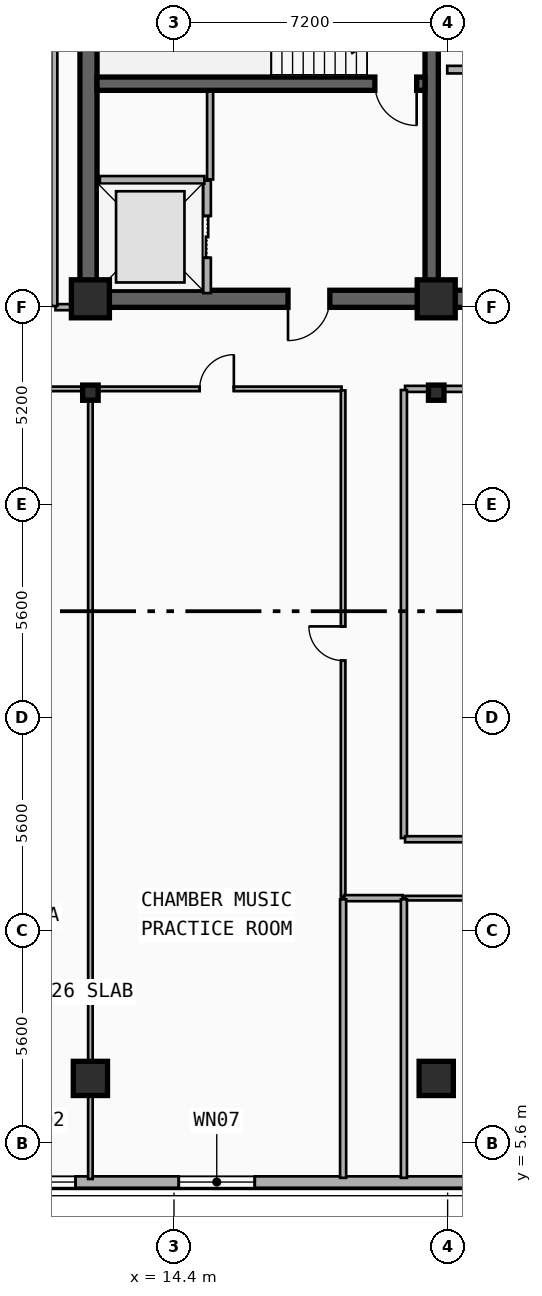
"""IFC4 building model, lengths in metres.
Left out: names, types, materials, properties, quantities, classifications, styles, units other than length and angle.
Written with IfcOpenShell. Run it as: python <this file> out.ifc"""

import sys

from ifc_helpers import new_model, si_unit, direction, frame, frame_2d, origin, origin_2d, place, context, subcontext, project, spatial, rectangle, i_section, extrude, element, fill, save


model = new_model("IFC4")
c1 = context("Model", 3, precision=1e-05, world=origin(), true_north=direction((0.0, 1.0)))
c2 = subcontext(c1, "Body", "Model", "MODEL_VIEW")
j1 = project(units=[si_unit("LENGTHUNIT", "METRE"), si_unit("PLANEANGLEUNIT", "RADIAN")], contexts=[c1])
p1 = place(None, origin())
s1 = spatial("IfcSite", under=j1, at=p1, CompositionType="ELEMENT")
p2 = place(p1, origin())
s2 = spatial("IfcBuilding", under=s1, at=p2, CompositionType="ELEMENT")
p3 = place(p2, frame((0.0, 0.0, 207.6)))
s3 = spatial("IfcBuildingStorey", under=s2, at=p3, CompositionType="ELEMENT", Elevation=207.6)
p4 = place(p3, frame((21.18, 27.82, 0.0), z_axis=(0.0, 0.0, 1.0), x_axis=(-1.0, 0.0, 0.0)))
e1 = element("IfcWall", 1, at=p4, inside=s3, PredefinedType="SHEAR", context=c2, shape_type="SweptSolid", body=[
    extrude(rectangle(XDim=9.03, YDim=0.45, at=frame_2d((4.515, 0.0))), origin(), (0.0, 0.0, 1.0), 3.6),
])
p5 = place(p4, frame((2.68, 0.0, 0.0)))
e2 = element("IfcOpeningElement", 2, at=p5, cuts=e1, PredefinedType="OPENING", context=c2, shape_type="SweptSolid", body=[
    extrude(rectangle(XDim=1.1, YDim=2.15, at=frame_2d((0.55, 1.075))), frame((0.0, 0.235, 0.0), z_axis=(0.0, -1.0, 0.0), x_axis=(1.0, 0.0, 0.0)), (0.0, 0.0, 1.0), 0.47),
])
p6 = place(p3, frame((33.15, 27.82, 0.0), z_axis=(0.0, 0.0, 1.0), x_axis=(-1.0, 0.0, 0.0)))
e3 = element("IfcWall", 3, at=p6, inside=s3, PredefinedType="SHEAR", context=c2, shape_type="SweptSolid", body=[
    extrude(rectangle(XDim=11.97, YDim=0.45, at=frame_2d((5.985, 0.0))), origin(), (0.0, 0.0, 1.0), 3.6),
])
p7 = place(p6, frame((6.1, 0.0, 0.0)))
e4 = element("IfcOpeningElement", 4, at=p7, cuts=e3, PredefinedType="OPENING", context=c2, shape_type="SweptSolid", body=[
    extrude(rectangle(XDim=1.6, YDim=2.2, at=frame_2d((0.8, 1.1))), frame((0.0, 0.235, 0.0), z_axis=(0.0, -1.0, 0.0), x_axis=(1.0, 0.0, 0.0)), (0.0, 0.0, 1.0), 0.47),
])
p8 = place(p3, frame((12.15, 28.045, 0.0), z_axis=(0.0, 0.0, 1.0), x_axis=(0.0, 1.0, 0.0)))
e5 = element("IfcWall", 5, at=p8, inside=s3, PredefinedType="SHEAR", context=c2, shape_type="SweptSolid", body=[
    extrude(rectangle(XDim=8.78, YDim=0.45, at=frame_2d((4.39, 0.0))), origin(), (0.0, 0.0, 1.0), 3.6),
])
p9 = place(p3, frame((21.18, 28.045, 0.0), z_axis=(0.0, 0.0, 1.0), x_axis=(0.0, 1.0, 0.0)))
e6 = element("IfcWall", 6, at=p9, inside=s3, PredefinedType="SHEAR", context=c2, shape_type="SweptSolid", body=[
    extrude(rectangle(XDim=8.78, YDim=0.35, at=frame_2d((4.39, 0.0))), origin(), (0.0, 0.0, 1.0), 3.6),
])
p10 = place(p3, frame((21.005, 33.48, 0.0), z_axis=(0.0, 0.0, 1.0), x_axis=(-1.0, 0.0, 0.0)))
e7 = element("IfcWall", 7, at=p10, inside=s3, PredefinedType="SHEAR", context=c2, shape_type="SweptSolid", body=[
    extrude(rectangle(XDim=8.63, YDim=0.35, at=frame_2d((4.315, 0.0))), origin(), (0.0, 0.0, 1.0), 3.6),
])
p11 = place(p10, frame((0.22, 0.0, 0.0)))
e8 = element("IfcOpeningElement", 8, at=p11, cuts=e7, PredefinedType="OPENING", context=c2, shape_type="SweptSolid", body=[
    extrude(rectangle(XDim=1.1, YDim=2.15, at=frame_2d((0.55, 1.075))), frame((0.0, 0.185, 0.0), z_axis=(0.0, -1.0, 0.0), x_axis=(1.0, 0.0, 0.0)), (0.0, 0.0, 1.0), 0.37),
])
for number, where, z_axis, x_axis in (
    (9, (12.2, 27.82, 0.0), (0.0, 0.0, 1.0), (1.0, 0.0, 0.0)),
    (10, (21.3, 27.82, 0.0), (0.0, 0.0, 1.0), (1.0, 0.0, 0.0)),
):
    element("IfcColumn", number, at=place(p3, frame(where, z_axis=z_axis, x_axis=x_axis)), inside=s3, PredefinedType="COLUMN", context=c2, shape_type="SweptSolid", body=[
        extrude(rectangle(XDim=1.0, YDim=1.0, at=origin_2d()), origin(), (0.0, 0.0, 1.0), 3.6),
    ])
for number, where, z_axis, x_axis in (
    (11, (12.2, 25.35, 0.0), (0.0, 0.0, 1.0), (1.0, 0.0, 0.0)),
    (12, (21.3, 25.35, 0.0), (0.0, 0.0, 1.0), (1.0, 0.0, 0.0)),
):
    element("IfcColumn", number, at=place(p3, frame(where, z_axis=z_axis, x_axis=x_axis)), inside=s3, PredefinedType="COLUMN", context=c2, shape_type="SweptSolid", body=[
        extrude(i_section(OverallWidth=0.408, OverallDepth=0.4, WebThickness=0.025, FlangeThickness=0.039, FilletRadius=0.015, at=origin_2d()), origin(), (0.0, 0.0, 1.0), 3.6),
    ])
for number, where, z_axis, x_axis in (
    (13, (12.2, 7.415, 0.0), (0.0, -0.09, 0.996), (1.0, 0.0, 0.0)),
    (14, (21.3, 7.415, 0.0), (0.0, -0.09, 0.996), (1.0, 0.0, 0.0)),
):
    element("IfcColumn", number, at=place(p3, frame(where, z_axis=z_axis, x_axis=x_axis)), inside=s3, PredefinedType="COLUMN", context=c2, shape_type="SweptSolid", body=[
        extrude(rectangle(XDim=0.9, YDim=0.9, at=origin_2d()), origin(), (0.0, 0.0, 1.0), 3.615),
    ])
p12 = place(p3, frame((48.0, 4.58, 0.0), z_axis=(0.0, 0.0, 1.0), x_axis=(-1.0, 0.0, 0.0)))
e15 = element("IfcWall", 15, at=p12, inside=s3, PredefinedType="SOLIDWALL", context=c2, shape_type="SweptSolid", body=[
    extrude(rectangle(XDim=38.4, YDim=0.3, at=frame_2d((19.2, 0.0))), origin(), (0.0, 0.0, 1.0), 3.34),
])
p13 = place(p12, frame((36.19, 0.0, 0.48)))
e16 = element("IfcOpeningElement", 16, at=p13, cuts=e15, PredefinedType="OPENING", context=c2, shape_type="SweptSolid", body=[
    extrude(rectangle(XDim=1.8, YDim=1.8, at=frame_2d((0.9, 0.9))), frame((0.0, 0.16, 0.0), z_axis=(0.0, -1.0, 0.0), x_axis=(1.0, 0.0, 0.0)), (0.0, 0.0, 1.0), 0.32),
])
p14 = place(p12, frame((31.475, 0.0, 0.65)))
e17 = element("IfcOpeningElement", 17, at=p14, cuts=e15, PredefinedType="OPENING", context=c2, shape_type="SweptSolid", body=[
    extrude(rectangle(XDim=2.0, YDim=2.2, at=frame_2d((1.0, 1.1))), frame((0.0, 0.16, 0.0), z_axis=(0.0, -1.0, 0.0), x_axis=(1.0, 0.0, 0.0)), (0.0, 0.0, 1.0), 0.32),
])
p15 = place(p12, frame((13.014, 0.0, 0.65)))
e18 = element("IfcOpeningElement", 18, at=p15, cuts=e15, PredefinedType="OPENING", context=c2, shape_type="SweptSolid", body=[
    extrude(rectangle(XDim=2.0, YDim=2.2, at=frame_2d((1.0, 1.1))), frame((0.0, 0.16, 0.0), z_axis=(0.0, -1.0, 0.0), x_axis=(1.0, 0.0, 0.0)), (0.0, 0.0, 1.0), 0.32),
])
p16 = place(p12, frame((0.369, 0.0, 0.75)))
e19 = element("IfcOpeningElement", 19, at=p16, cuts=e15, PredefinedType="OPENING", context=c2, shape_type="SweptSolid", body=[
    extrude(rectangle(XDim=1.6, YDim=1.95, at=frame_2d((0.8, 0.975))), frame((0.0, 0.16, 0.0), z_axis=(0.0, -1.0, 0.0), x_axis=(1.0, 0.0, 0.0)), (0.0, 0.0, 1.0), 0.32),
])
p17 = place(p12, frame((7.35, 0.0, 0.65)))
e20 = element("IfcOpeningElement", 20, at=p17, cuts=e15, PredefinedType="OPENING", context=c2, shape_type="SweptSolid", body=[
    extrude(rectangle(XDim=2.0, YDim=2.2, at=frame_2d((1.0, 1.1))), frame((0.0, 0.16, 0.0), z_axis=(0.0, -1.0, 0.0), x_axis=(1.0, 0.0, 0.0)), (0.0, 0.0, 1.0), 0.32),
])
p18 = place(p3, frame((15.27, 27.97, 0.0), z_axis=(0.0, 0.0, 1.0), x_axis=(0.0, 1.0, 0.0)))
e21 = element("IfcWall", 21, at=p18, inside=s3, PredefinedType="PARTITIONING", context=c2, shape_type="SweptSolid", body=[
    extrude(rectangle(XDim=2.96, YDim=0.2, at=frame_2d((1.48, 0.0))), origin(), (0.0, 0.0, 1.0), 2.41),
])
p19 = place(p18, frame((0.93, 0.0, 0.0)))
e22 = element("IfcOpeningElement", 22, at=p19, cuts=e21, PredefinedType="OPENING", context=c2, shape_type="SweptSolid", body=[
    extrude(rectangle(XDim=1.1, YDim=2.15, at=frame_2d((0.55, 1.075))), frame((0.0, 0.11, 0.0), z_axis=(0.0, -1.0, 0.0), x_axis=(1.0, 0.0, 0.0)), (0.0, 0.0, 1.0), 0.22),
])
p20 = place(p3, frame((12.45, 30.95, 0.0), z_axis=(0.0, 0.0, 1.0), x_axis=(1.0, 0.0, 0.0)))
e23 = element("IfcWall", 23, at=p20, inside=s3, PredefinedType="PARTITIONING", context=c2, shape_type="SweptSolid", body=[
    extrude(rectangle(XDim=2.75, YDim=0.2, at=frame_2d((1.375, 0.0))), origin(), (0.0, 0.0, 1.0), 2.41),
])
p21 = place(p3, frame((21.59, 33.85, 0.0), z_axis=(0.0, 0.0, 1.0), x_axis=(1.0, 0.0, 0.0)))
e24 = element("IfcWall", 24, at=p21, inside=s3, PredefinedType="PARTITIONING", context=c2, shape_type="SweptSolid", body=[
    extrude(rectangle(XDim=1.97, YDim=0.2, at=frame_2d((0.985, 0.0))), origin(), (0.0, 0.0, 1.0), 2.41),
])
p22 = place(p3, frame((5.66, 25.45, 0.0), z_axis=(0.0, 0.0, 1.0), x_axis=(1.0, 0.0, 0.0)))
e25 = element("IfcWall", 25, at=p22, inside=s3, PredefinedType="PARTITIONING", context=c2, shape_type="SweptSolid", body=[
    extrude(rectangle(XDim=6.5, YDim=0.12, at=frame_2d((3.25, 0.0))), origin(), (0.0, 0.0, 1.0), 2.52),
])
p23 = place(p22, frame((2.8, 0.0, 0.0)))
e26 = element("IfcOpeningElement", 26, at=p23, cuts=e25, PredefinedType="OPENING", context=c2, shape_type="SweptSolid", body=[
    extrude(rectangle(XDim=0.9, YDim=2.1, at=frame_2d((0.45, 1.05))), frame((0.0, 0.07, 0.0), z_axis=(0.0, -1.0, 0.0), x_axis=(1.0, 0.0, 0.0)), (0.0, 0.0, 1.0), 0.14),
])
p24 = place(p3, frame((12.24, 25.45, 0.0), z_axis=(0.0, 0.0, 1.0), x_axis=(1.0, 0.0, 0.0)))
e27 = element("IfcWall", 27, at=p24, inside=s3, PredefinedType="PARTITIONING", context=c2, shape_type="SweptSolid", body=[
    extrude(rectangle(XDim=6.57, YDim=0.12, at=frame_2d((3.285, 0.0))), origin(), (0.0, 0.0, 1.0), 2.52),
])
p25 = place(p24, frame((2.835, 0.0, 0.0)))
e28 = element("IfcOpeningElement", 28, at=p25, cuts=e27, PredefinedType="OPENING", context=c2, shape_type="SweptSolid", body=[
    extrude(rectangle(XDim=0.9, YDim=2.1, at=frame_2d((0.45, 1.05))), frame((0.0, 0.07, 0.0), z_axis=(0.0, -1.0, 0.0), x_axis=(1.0, 0.0, 0.0)), (0.0, 0.0, 1.0), 0.14),
])
p26 = place(p3, frame((18.85, 12.09, 0.0), z_axis=(0.0, 0.0, 1.0), x_axis=(0.0, 1.0, 0.0)))
e29 = element("IfcWall", 29, at=p26, inside=s3, PredefinedType="PARTITIONING", context=c2, shape_type="SweptSolid", body=[
    extrude(rectangle(XDim=13.32, YDim=0.12, at=frame_2d((6.66, 0.0))), origin(), (0.0, 0.0, 1.0), 2.77),
])
p27 = place(p26, frame((6.21, 0.0, 0.0)))
e30 = element("IfcOpeningElement", 30, at=p27, cuts=e29, PredefinedType="OPENING", context=c2, shape_type="SweptSolid", body=[
    extrude(rectangle(XDim=0.9, YDim=2.1, at=frame_2d((0.45, 1.05))), frame((0.0, 0.07, 0.0), z_axis=(0.0, -1.0, 0.0), x_axis=(1.0, 0.0, 0.0)), (0.0, 0.0, 1.0), 0.14),
])
p28 = place(p3, frame((20.49, 12.05, 0.0), z_axis=(0.0, 0.0, 1.0), x_axis=(1.0, 0.0, 0.0)))
e31 = element("IfcWall", 31, at=p28, inside=s3, PredefinedType="PARTITIONING", context=c2, shape_type="SweptSolid", body=[
    extrude(rectangle(XDim=15.82, YDim=0.12, at=frame_2d((7.91, 0.0))), origin(), (0.0, 0.0, 1.0), 2.52),
])
p29 = place(p28, frame((7.46, 0.0, 0.0)))
e32 = element("IfcOpeningElement", 32, at=p29, cuts=e31, PredefinedType="OPENING", context=c2, shape_type="SweptSolid", body=[
    extrude(rectangle(XDim=0.9, YDim=2.1, at=frame_2d((0.45, 1.05))), frame((0.0, 0.07, 0.0), z_axis=(0.0, -1.0, 0.0), x_axis=(1.0, 0.0, 0.0)), (0.0, 0.0, 1.0), 0.14),
])
p30 = place(p3, frame((12.2, 4.66, 0.0), z_axis=(0.0, 0.0, 1.0), x_axis=(0.0, 1.0, 0.0)))
e33 = element("IfcWall", 33, at=p30, inside=s3, PredefinedType="PARTITIONING", context=c2, shape_type="SweptSolid", body=[
    extrude(rectangle(XDim=20.75, YDim=0.12, at=frame_2d((10.375, 0.0))), origin(), (0.0, 0.0, 1.0), 2.52),
])
p31 = place(p3, frame((15.35, 30.96, 0.0), z_axis=(0.0, 0.0, 1.0), x_axis=(0.0, 1.0, 0.0)))
e34 = element("IfcWall", 34, at=p31, inside=s3, PredefinedType="PARTITIONING", context=c2, shape_type="SweptSolid", body=[
    extrude(rectangle(XDim=2.31, YDim=0.16, at=frame_2d((1.155, 0.0))), origin(), (0.0, 0.0, 1.0), 3.34),
])
p32 = place(p3, frame((20.48, 25.45, 0.0), z_axis=(0.0, 0.0, 1.0), x_axis=(1.0, 0.0, 0.0)))
e35 = element("IfcWall", 35, at=p32, inside=s3, PredefinedType="PARTITIONING", context=c2, shape_type="SweptSolid", body=[
    extrude(rectangle(XDim=15.84, YDim=0.16, at=frame_2d((7.92, 0.0))), origin(), (0.0, 0.0, 1.0), 2.52),
])
p33 = place(p3, frame((11.28, 27.6, 0.0), z_axis=(0.0, 0.0, 1.0), x_axis=(1.0, 0.0, 0.0)))
e36 = element("IfcWall", 36, at=p33, inside=s3, PredefinedType="PARTITIONING", context=c2, shape_type="SweptSolid", body=[
    extrude(rectangle(XDim=0.84, YDim=0.16, at=frame_2d((0.42, 0.0))), origin(), (0.0, 0.0, 1.0), 2.41),
])
p34 = place(p3, frame((18.88, 12.05, 0.0), z_axis=(0.0, 0.0, 1.0), x_axis=(1.0, 0.0, 0.0)))
e37 = element("IfcWall", 37, at=p34, inside=s3, PredefinedType="PARTITIONING", context=c2, shape_type="SweptSolid", body=[
    extrude(rectangle(XDim=1.54, YDim=0.16, at=frame_2d((0.77, 0.0))), origin(), (0.0, 0.0, 1.0), 3.34),
])
p35 = place(p3, frame((20.45, 13.63, 0.0), z_axis=(0.0, 0.0, 1.0), x_axis=(0.0, 1.0, 0.0)))
e38 = element("IfcWall", 38, at=p35, inside=s3, PredefinedType="PARTITIONING", context=c2, shape_type="SweptSolid", body=[
    extrude(rectangle(XDim=11.79, YDim=0.16, at=frame_2d((5.895, 0.0))), origin(), (0.0, 0.0, 1.0), 2.77),
])
p36 = place(p3, frame((20.48, 13.6, 0.0), z_axis=(0.0, 0.0, 1.0), x_axis=(1.0, 0.0, 0.0)))
e39 = element("IfcWall", 39, at=p36, inside=s3, PredefinedType="PARTITIONING", context=c2, shape_type="SweptSolid", body=[
    extrude(rectangle(XDim=2.64, YDim=0.16, at=frame_2d((1.32, 0.0))), origin(), (0.0, 0.0, 1.0), 2.52),
])
p37 = place(p3, frame((11.25, 27.63, 0.0), z_axis=(0.0, 0.0, 1.0), x_axis=(0.0, 1.0, 0.0)))
e40 = element("IfcWall", 40, at=p37, inside=s3, PredefinedType="PARTITIONING", context=c2, shape_type="SweptSolid", body=[
    extrude(rectangle(XDim=10.24, YDim=0.16, at=frame_2d((5.12, 0.0))), origin(), (0.0, 0.0, 1.0), 2.82),
])
for number, where, z_axis, x_axis in (
    (41, (18.85, 4.69, 0.0), (0.0, 0.0, 1.0), (0.0, 1.0, 0.0)),
    (42, (20.45, 4.69, 0.0), (0.0, 0.0, 1.0), (0.0, 1.0, 0.0)),
):
    element("IfcWall", number, at=place(p3, frame(where, z_axis=z_axis, x_axis=x_axis)), inside=s3, PredefinedType="PARTITIONING", context=c2, shape_type="SweptSolid", body=[
        extrude(rectangle(XDim=7.33, YDim=0.16, at=frame_2d((3.665, 0.0))), origin(), (0.0, 0.0, 1.0), 2.93),
    ])
p38 = place(p13, origin())
e43 = element("IfcWindow", 43, at=p38, inside=s3, PartitioningType="SINGLE_PANEL", PredefinedType="WINDOW", context=c2, shape_type="SweptSolid", body=[
    extrude(rectangle(XDim=1.8, YDim=1.8, at=frame_2d((0.9, 0.9))), frame((0.0, 0.03, 0.0), z_axis=(0.0, -1.0, 0.0), x_axis=(1.0, 0.0, 0.0)), (0.0, 0.0, 1.0), 0.06),
])
fill(e16, e43)
p39 = place(p14, origin())
e44 = element("IfcWindow", 44, at=p39, inside=s3, PartitioningType="SINGLE_PANEL", PredefinedType="WINDOW", context=c2, shape_type="SweptSolid", body=[
    extrude(rectangle(XDim=2.0, YDim=2.2, at=frame_2d((1.0, 1.1))), frame((0.0, 0.03, 0.0), z_axis=(0.0, -1.0, 0.0), x_axis=(1.0, 0.0, 0.0)), (0.0, 0.0, 1.0), 0.06),
])
fill(e17, e44)
p40 = place(p19, origin())
e45 = element("IfcDoor", 45, at=p40, inside=s3, OperationType="DOUBLE_DOOR_SLIDING", PredefinedType="DOOR", context=c2, shape_type="SweptSolid", body=[
    extrude(rectangle(XDim=1.1, YDim=2.15, at=frame_2d((0.55, 1.075))), frame((0.0, 0.025, 0.0), z_axis=(0.0, -1.0, 0.0), x_axis=(1.0, 0.0, 0.0)), (0.0, 0.0, 1.0), 0.05),
])
fill(e22, e45)
p41 = place(p11, origin())
e46 = element("IfcDoor", 46, at=p41, inside=s3, OperationType="SINGLE_SWING_LEFT", PredefinedType="DOOR", context=c2, shape_type="SweptSolid", body=[
    extrude(rectangle(XDim=1.1, YDim=2.15, at=frame_2d((0.55, 1.075))), frame((0.0, 0.025, 0.0), z_axis=(0.0, -1.0, 0.0), x_axis=(1.0, 0.0, 0.0)), (0.0, 0.0, 1.0), 0.05),
])
fill(e8, e46)
p42 = place(p5, origin())
e47 = element("IfcDoor", 47, at=p42, inside=s3, OperationType="SINGLE_SWING_RIGHT", PredefinedType="DOOR", context=c2, shape_type="SweptSolid", body=[
    extrude(rectangle(XDim=1.1, YDim=2.15, at=frame_2d((0.55, 1.075))), frame((0.0, 0.025, 0.0), z_axis=(0.0, -1.0, 0.0), x_axis=(1.0, 0.0, 0.0)), (0.0, 0.0, 1.0), 0.05),
])
fill(e2, e47)
p43 = place(p25, origin())
e48 = element("IfcDoor", 48, at=p43, inside=s3, OperationType="SINGLE_SWING_RIGHT", PredefinedType="DOOR", context=c2, shape_type="SweptSolid", body=[
    extrude(rectangle(XDim=0.9, YDim=2.1, at=frame_2d((0.45, 1.05))), frame((0.0, 0.025, 0.0), z_axis=(0.0, -1.0, 0.0), x_axis=(1.0, 0.0, 0.0)), (0.0, 0.0, 1.0), 0.05),
])
fill(e28, e48)
p44 = place(p27, origin())
e49 = element("IfcDoor", 49, at=p44, inside=s3, OperationType="SINGLE_SWING_RIGHT", PredefinedType="DOOR", context=c2, shape_type="SweptSolid", body=[
    extrude(rectangle(XDim=0.9, YDim=2.1, at=frame_2d((0.45, 1.05))), frame((0.0, 0.025, 0.0), z_axis=(0.0, -1.0, 0.0), x_axis=(1.0, 0.0, 0.0)), (0.0, 0.0, 1.0), 0.05),
])
fill(e30, e49)
save(model, sys.argv[1])
